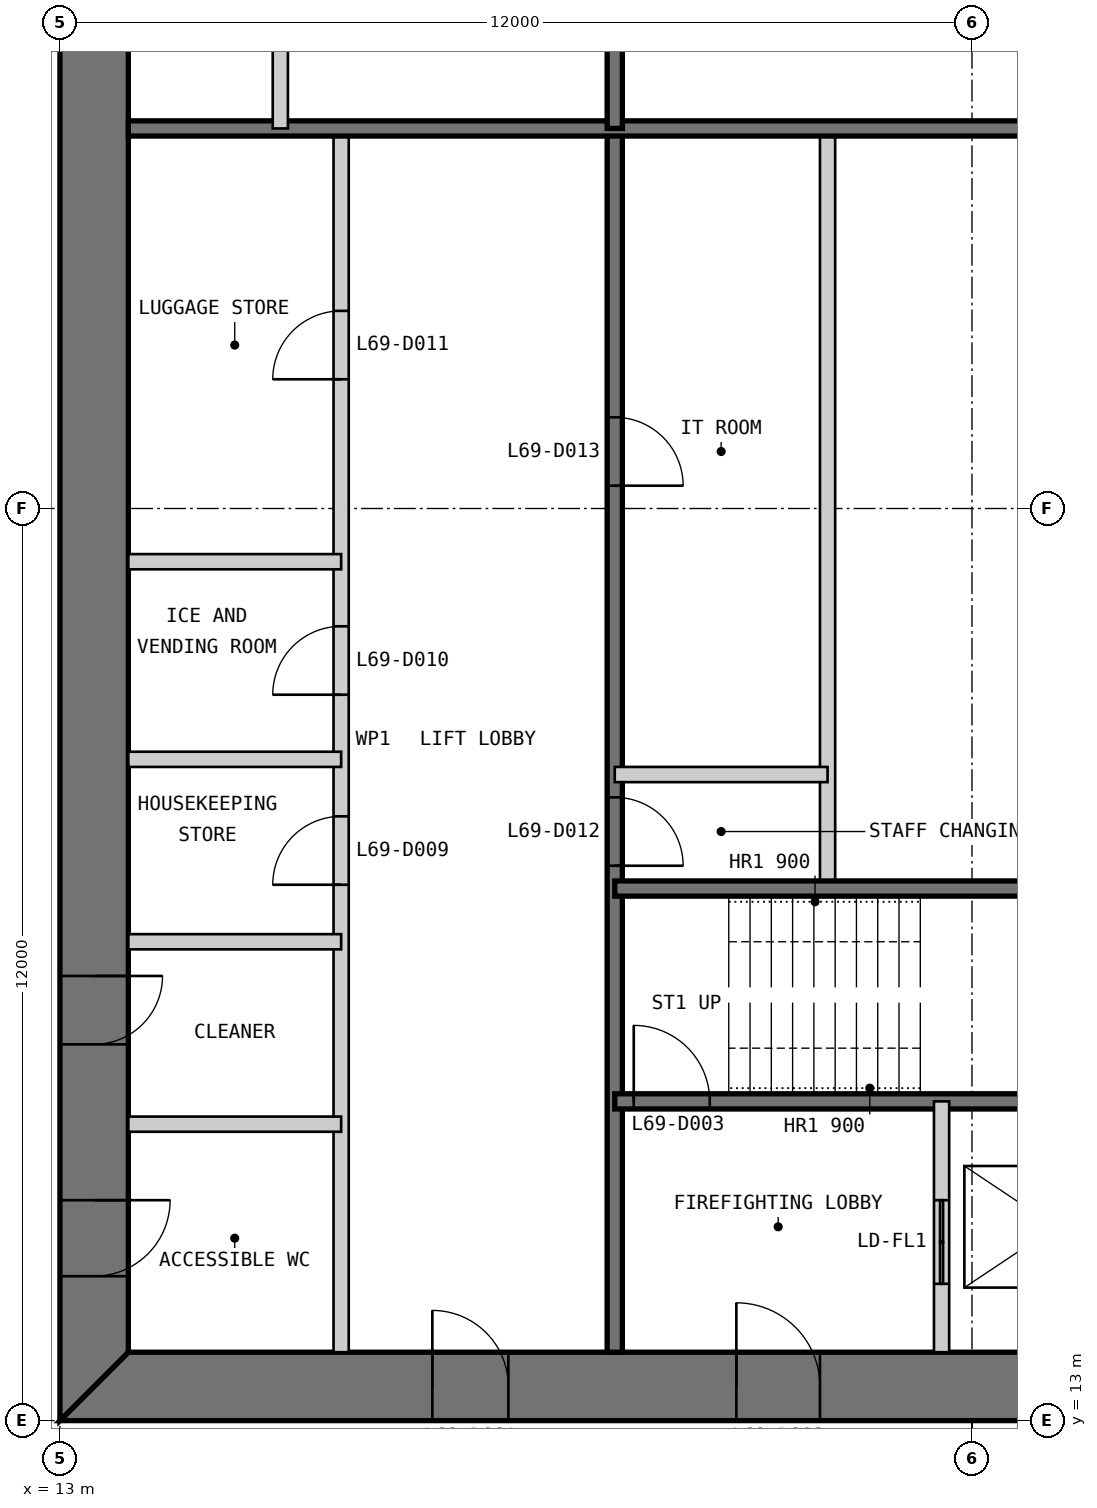
"""IFC4 building model, lengths in metres.
Left out: names, types, materials, properties, quantities, classifications, styles, units other than length and angle.
Written with IfcOpenShell. Run it as: python <this file> out.ifc"""

import sys

from ifc_helpers import new_model, si_unit, direction, frame, frame_2d, origin, place, context, subcontext, project, spatial, polyline, rectangle, outline, extrude, element, fill, save


model = new_model("IFC4")
c1 = context("Model", 3, precision=1e-05, world=origin(), true_north=direction((0.0, 1.0)))
c2 = subcontext(c1, "Body", "Model", "MODEL_VIEW")
j1 = project(units=[si_unit("LENGTHUNIT", "METRE"), si_unit("PLANEANGLEUNIT", "RADIAN")], contexts=[c1])
p1 = place(None, origin())
s1 = spatial("IfcSite", under=j1, at=p1, CompositionType="ELEMENT")
p2 = place(p1, origin())
s2 = spatial("IfcBuilding", under=s1, at=p2, CompositionType="ELEMENT")
p3 = place(p2, frame((0.0, 0.0, 286.6)))
s3 = spatial("IfcBuildingStorey", under=s2, at=p3, CompositionType="ELEMENT", Elevation=286.6)
p4 = place(p3, frame((13.0, 13.45, 0.0), z_axis=(0.0, 0.0, 1.0), x_axis=(1.0, 0.0, 0.0)))
e1 = element("IfcWall", 1, at=p4, inside=s3, PredefinedType="SHEAR", context=c2, shape_type="SweptSolid", body=[
    extrude(outline(polyline([(0.0, -0.45), (24.0, -0.45), (23.1, 0.45), (0.9, 0.45), (0.0, -0.45)])), origin(), (0.0, 0.0, 1.0), 3.4),
])
p5 = place(p4, frame((4.9, 0.0, 0.0)))
e2 = element("IfcOpeningElement", 2, at=p5, cuts=e1, PredefinedType="OPENING", context=c2, shape_type="SweptSolid", body=[
    extrude(rectangle(XDim=1.0, YDim=2.2, at=frame_2d((0.5, 1.1))), frame((0.0, 0.46, 0.0), z_axis=(0.0, -1.0, 0.0), x_axis=(1.0, 0.0, 0.0)), (0.0, 0.0, 1.0), 0.92),
])
p6 = place(p4, frame((8.9, 0.0, 0.0)))
e3 = element("IfcOpeningElement", 3, at=p6, cuts=e1, PredefinedType="OPENING", context=c2, shape_type="SweptSolid", body=[
    extrude(rectangle(XDim=1.1, YDim=2.2, at=frame_2d((0.55, 1.1))), frame((0.0, 0.46, 0.0), z_axis=(0.0, -1.0, 0.0), x_axis=(1.0, 0.0, 0.0)), (0.0, 0.0, 1.0), 0.92),
])
p7 = place(p4, frame((15.05, 0.0, 0.0)))
e4 = element("IfcOpeningElement", 4, at=p7, cuts=e1, PredefinedType="OPENING", context=c2, shape_type="SweptSolid", body=[
    extrude(rectangle(XDim=0.9, YDim=2.2, at=frame_2d((0.45, 1.1))), frame((0.0, 0.46, 0.0), z_axis=(0.0, -1.0, 0.0), x_axis=(1.0, 0.0, 0.0)), (0.0, 0.0, 1.0), 0.92),
])
p8 = place(p4, frame((17.9, 0.0, 0.0)))
e5 = element("IfcOpeningElement", 5, at=p8, cuts=e1, PredefinedType="OPENING", context=c2, shape_type="SweptSolid", body=[
    extrude(rectangle(XDim=1.0, YDim=2.2, at=frame_2d((0.5, 1.1))), frame((0.0, 0.46, 0.0), z_axis=(0.0, -1.0, 0.0), x_axis=(1.0, 0.0, 0.0)), (0.0, 0.0, 1.0), 0.92),
])
p9 = place(p4, frame((21.4, 0.0, 0.0)))
e6 = element("IfcOpeningElement", 6, at=p9, cuts=e1, PredefinedType="OPENING", context=c2, shape_type="SweptSolid", body=[
    extrude(rectangle(XDim=1.0, YDim=2.2, at=frame_2d((0.5, 1.1))), frame((0.0, 0.46, 0.0), z_axis=(0.0, -1.0, 0.0), x_axis=(1.0, 0.0, 0.0)), (0.0, 0.0, 1.0), 0.92),
])
p10 = place(p3, frame((13.45, 36.1, 0.0), z_axis=(0.0, 0.0, 1.0), x_axis=(0.0, -1.0, 0.0)))
e7 = element("IfcWall", 7, at=p10, inside=s3, PredefinedType="SHEAR", context=c2, shape_type="SweptSolid", body=[
    extrude(outline(polyline([(-0.9, -0.45), (23.1, -0.45), (22.2, 0.45), (0.0, 0.45), (-0.9, -0.45)])), origin(), (0.0, 0.0, 1.0), 3.4),
])
p11 = place(p10, frame((20.2, 0.0, 0.0)))
e8 = element("IfcOpeningElement", 8, at=p11, cuts=e7, PredefinedType="OPENING", context=c2, shape_type="SweptSolid", body=[
    extrude(rectangle(XDim=1.0, YDim=2.2, at=frame_2d((0.5, 1.1))), frame((0.0, 0.46, 0.0), z_axis=(0.0, -1.0, 0.0), x_axis=(1.0, 0.0, 0.0)), (0.0, 0.0, 1.0), 0.92),
])
p12 = place(p10, frame((17.25, 0.0, 0.0)))
e9 = element("IfcOpeningElement", 9, at=p12, cuts=e7, PredefinedType="OPENING", context=c2, shape_type="SweptSolid", body=[
    extrude(rectangle(XDim=0.9, YDim=2.2, at=frame_2d((0.45, 1.1))), frame((0.0, 0.46, 0.0), z_axis=(0.0, -1.0, 0.0), x_axis=(1.0, 0.0, 0.0)), (0.0, 0.0, 1.0), 0.92),
])
p13 = place(p3, frame((16.7, 13.9, 0.0), z_axis=(0.0, 0.0, 1.0), x_axis=(0.0, 1.0, 0.0)))
e10 = element("IfcWall", 10, at=p13, inside=s3, PredefinedType="PARTITIONING", context=c2, shape_type="SweptSolid", body=[
    extrude(rectangle(XDim=16.1, YDim=0.2, at=frame_2d((8.05, 0.0))), origin(), (0.0, 0.0, 1.0), 3.2),
])
p14 = place(p13, frame((6.15, 0.0, 0.0)))
e11 = element("IfcOpeningElement", 11, at=p14, cuts=e10, PredefinedType="OPENING", context=c2, shape_type="SweptSolid", body=[
    extrude(rectangle(XDim=0.9, YDim=2.2, at=frame_2d((0.45, 1.1))), frame((0.0, 0.11, 0.0), z_axis=(0.0, -1.0, 0.0), x_axis=(1.0, 0.0, 0.0)), (0.0, 0.0, 1.0), 0.22),
])
p15 = place(p13, frame((8.65, 0.0, 0.0)))
e12 = element("IfcOpeningElement", 12, at=p15, cuts=e10, PredefinedType="OPENING", context=c2, shape_type="SweptSolid", body=[
    extrude(rectangle(XDim=0.9, YDim=2.2, at=frame_2d((0.45, 1.1))), frame((0.0, 0.11, 0.0), z_axis=(0.0, -1.0, 0.0), x_axis=(1.0, 0.0, 0.0)), (0.0, 0.0, 1.0), 0.22),
])
p16 = place(p13, frame((12.8, 0.0, 0.0)))
e13 = element("IfcOpeningElement", 13, at=p16, cuts=e10, PredefinedType="OPENING", context=c2, shape_type="SweptSolid", body=[
    extrude(rectangle(XDim=0.9, YDim=2.2, at=frame_2d((0.45, 1.1))), frame((0.0, 0.11, 0.0), z_axis=(0.0, -1.0, 0.0), x_axis=(1.0, 0.0, 0.0)), (0.0, 0.0, 1.0), 0.22),
])
p17 = place(p3, frame((20.3, 13.9, 0.0), z_axis=(0.0, 0.0, 1.0), x_axis=(0.0, 1.0, 0.0)))
e14 = element("IfcWall", 14, at=p17, inside=s3, PredefinedType="SOLIDWALL", context=c2, shape_type="SweptSolid", body=[
    extrude(rectangle(XDim=16.1, YDim=0.2, at=frame_2d((8.05, 0.0))), origin(), (0.0, 0.0, 1.0), 3.2),
])
p18 = place(p17, frame((6.4, 0.0, 0.0)))
e15 = element("IfcOpeningElement", 15, at=p18, cuts=e14, PredefinedType="OPENING", context=c2, shape_type="SweptSolid", body=[
    extrude(rectangle(XDim=0.9, YDim=2.2, at=frame_2d((0.45, 1.1))), frame((0.0, 0.11, 0.0), z_axis=(0.0, -1.0, 0.0), x_axis=(1.0, 0.0, 0.0)), (0.0, 0.0, 1.0), 0.22),
])
p19 = place(p17, frame((11.4, 0.0, 0.0)))
e16 = element("IfcOpeningElement", 16, at=p19, cuts=e14, PredefinedType="OPENING", context=c2, shape_type="SweptSolid", body=[
    extrude(rectangle(XDim=0.9, YDim=2.2, at=frame_2d((0.45, 1.1))), frame((0.0, 0.11, 0.0), z_axis=(0.0, -1.0, 0.0), x_axis=(1.0, 0.0, 0.0)), (0.0, 0.0, 1.0), 0.22),
])
p20 = place(p3, frame((23.1, 20.0, 0.0), z_axis=(0.0, 0.0, 1.0), x_axis=(0.0, 1.0, 0.0)))
e17 = element("IfcWall", 17, at=p20, inside=s3, PredefinedType="PARTITIONING", context=c2, shape_type="SweptSolid", body=[
    extrude(rectangle(XDim=10.0, YDim=0.2, at=frame_2d((5.0, 0.0))), origin(), (0.0, 0.0, 1.0), 3.2),
])
p21 = place(p3, frame((20.3, 17.2, 0.0), z_axis=(0.0, 0.0, 1.0), x_axis=(1.0, 0.0, 0.0)))
e18 = element("IfcWall", 18, at=p21, inside=s3, PredefinedType="SOLIDWALL", context=c2, shape_type="SweptSolid", body=[
    extrude(rectangle(XDim=9.4, YDim=0.2, at=frame_2d((4.7, 0.0))), origin(), (0.0, 0.0, 1.0), 3.2),
])
p22 = place(p21, frame((0.25, 0.0, 0.0)))
e19 = element("IfcOpeningElement", 19, at=p22, cuts=e18, PredefinedType="OPENING", context=c2, shape_type="SweptSolid", body=[
    extrude(rectangle(XDim=1.0, YDim=2.2, at=frame_2d((0.5, 1.1))), frame((0.0, 0.11, 0.0), z_axis=(0.0, -1.0, 0.0), x_axis=(1.0, 0.0, 0.0)), (0.0, 0.0, 1.0), 0.22),
])
p23 = place(p3, frame((20.3, 20.0, 0.0), z_axis=(0.0, 0.0, 1.0), x_axis=(1.0, 0.0, 0.0)))
e20 = element("IfcWall", 20, at=p23, inside=s3, PredefinedType="SOLIDWALL", context=c2, shape_type="SweptSolid", body=[
    extrude(rectangle(XDim=15.8, YDim=0.2, at=frame_2d((7.9, 0.0))), origin(), (0.0, 0.0, 1.0), 3.2),
])
p24 = place(p3, frame((24.6, 13.9, 0.0), z_axis=(0.0, 0.0, 1.0), x_axis=(0.0, 1.0, 0.0)))
e21 = element("IfcWall", 21, at=p24, inside=s3, PredefinedType="PARTITIONING", context=c2, shape_type="SweptSolid", body=[
    extrude(rectangle(XDim=3.3, YDim=0.2, at=frame_2d((1.65, 0.0))), origin(), (0.0, 0.0, 1.0), 3.2),
])
p25 = place(p24, frame((0.9, 0.0, 0.0)))
e22 = element("IfcOpeningElement", 22, at=p25, cuts=e21, PredefinedType="OPENING", context=c2, shape_type="SweptSolid", body=[
    extrude(rectangle(XDim=1.1, YDim=2.2, at=frame_2d((0.55, 1.1))), frame((0.0, 0.11, 0.0), z_axis=(0.0, -1.0, 0.0), x_axis=(1.0, 0.0, 0.0)), (0.0, 0.0, 1.0), 0.22),
])
for number, where, z_axis, x_axis in (
    (23, (13.9, 16.9, 0.0), (0.0, 0.0, 1.0), (1.0, 0.0, 0.0)),
    (24, (13.9, 19.3, 0.0), (0.0, 0.0, 1.0), (1.0, 0.0, 0.0)),
    (25, (13.9, 21.7, 0.0), (0.0, 0.0, 1.0), (1.0, 0.0, 0.0)),
    (26, (13.9, 24.3, 0.0), (0.0, 0.0, 1.0), (1.0, 0.0, 0.0)),
    (27, (20.3, 21.5, 0.0), (0.0, 0.0, 1.0), (1.0, 0.0, 0.0)),
):
    element("IfcWall", number, at=place(p3, frame(where, z_axis=z_axis, x_axis=x_axis)), inside=s3, PredefinedType="PARTITIONING", context=c2, shape_type="SweptSolid", body=[
        extrude(rectangle(XDim=2.8, YDim=0.2, at=frame_2d((1.4, 0.0))), origin(), (0.0, 0.0, 1.0), 3.2),
    ])
p26 = place(p3, frame((29.7, 30.0, 0.0), z_axis=(0.0, 0.0, 1.0), x_axis=(-1.0, 0.0, 0.0)))
e28 = element("IfcWall", 28, at=p26, inside=s3, PredefinedType="SOLIDWALL", context=c2, shape_type="SweptSolid", body=[
    extrude(rectangle(XDim=15.8, YDim=0.2, at=frame_2d((7.9, 0.0))), origin(), (0.0, 0.0, 1.0), 3.2),
])
p27 = place(p3, frame((20.3, 36.1, 0.0), z_axis=(0.0, 0.0, 1.0), x_axis=(0.0, -1.0, 0.0)))
e29 = element("IfcWall", 29, at=p27, inside=s3, PredefinedType="SOLIDWALL", context=c2, shape_type="SweptSolid", body=[
    extrude(rectangle(XDim=6.1, YDim=0.2, at=frame_2d((3.05, 0.0))), origin(), (0.0, 0.0, 1.0), 3.2),
])
p28 = place(p3, frame((15.9, 36.1, 0.0), z_axis=(0.0, 0.0, 1.0), x_axis=(0.0, -1.0, 0.0)))
e30 = element("IfcWall", 30, at=p28, inside=s3, PredefinedType="PARTITIONING", context=c2, shape_type="SweptSolid", body=[
    extrude(rectangle(XDim=6.1, YDim=0.2, at=frame_2d((3.05, 0.0))), origin(), (0.0, 0.0, 1.0), 3.2),
])
p29 = place(p5, origin())
e31 = element("IfcDoor", 31, at=p29, inside=s3, OperationType="SINGLE_SWING_LEFT", PredefinedType="DOOR", context=c2, shape_type="SweptSolid", body=[
    extrude(rectangle(XDim=1.0, YDim=2.2, at=frame_2d((0.5, 1.1))), frame((0.0, 0.025, 0.0), z_axis=(0.0, -1.0, 0.0), x_axis=(1.0, 0.0, 0.0)), (0.0, 0.0, 1.0), 0.05),
    extrude(outline(polyline([(0.0, 0.0), (0.04, 0.0), (0.04, 2.16), (0.96, 2.16), (0.96, 0.0), (1.0, 0.0), (1.0, 2.2), (0.0, 2.2), (0.0, 0.0)])), frame((0.0, 0.3, 0.0), z_axis=(0.0, -1.0, 0.0), x_axis=(1.0, 0.0, 0.0)), (0.0, 0.0, 1.0), 0.6),
])
fill(e2, e31)
p30 = place(p6, origin())
e32 = element("IfcDoor", 32, at=p30, inside=s3, OperationType="SINGLE_SWING_LEFT", PredefinedType="DOOR", context=c2, shape_type="SweptSolid", body=[
    extrude(rectangle(XDim=1.1, YDim=2.2, at=frame_2d((0.55, 1.1))), frame((0.0, 0.025, 0.0), z_axis=(0.0, -1.0, 0.0), x_axis=(1.0, 0.0, 0.0)), (0.0, 0.0, 1.0), 0.05),
    extrude(outline(polyline([(0.0, 0.0), (0.04, 0.0), (0.04, 2.16), (1.06, 2.16), (1.06, 0.0), (1.1, 0.0), (1.1, 2.2), (0.0, 2.2), (0.0, 0.0)])), frame((0.0, 0.3, 0.0), z_axis=(0.0, -1.0, 0.0), x_axis=(1.0, 0.0, 0.0)), (0.0, 0.0, 1.0), 0.6),
])
fill(e3, e32)
p31 = place(p22, origin())
e33 = element("IfcDoor", 33, at=p31, inside=s3, OperationType="SINGLE_SWING_LEFT", PredefinedType="DOOR", context=c2, shape_type="SweptSolid", body=[
    extrude(rectangle(XDim=1.0, YDim=2.2, at=frame_2d((0.5, 1.1))), frame((0.0, 0.025, 0.0), z_axis=(0.0, -1.0, 0.0), x_axis=(1.0, 0.0, 0.0)), (0.0, 0.0, 1.0), 0.05),
])
fill(e19, e33)
p32 = place(p11, origin())
e34 = element("IfcDoor", 34, at=p32, inside=s3, OperationType="SINGLE_SWING_LEFT", PredefinedType="DOOR", context=c2, shape_type="SweptSolid", body=[
    extrude(rectangle(XDim=1.0, YDim=2.2, at=frame_2d((0.5, 1.1))), frame((0.0, 0.025, 0.0), z_axis=(0.0, -1.0, 0.0), x_axis=(1.0, 0.0, 0.0)), (0.0, 0.0, 1.0), 0.05),
    extrude(outline(polyline([(0.0, 0.0), (0.04, 0.0), (0.04, 2.16), (0.96, 2.16), (0.96, 0.0), (1.0, 0.0), (1.0, 2.2), (0.0, 2.2), (0.0, 0.0)])), frame((0.0, 0.3, 0.0), z_axis=(0.0, -1.0, 0.0), x_axis=(1.0, 0.0, 0.0)), (0.0, 0.0, 1.0), 0.6),
])
fill(e8, e34)
p33 = place(p12, origin())
e35 = element("IfcDoor", 35, at=p33, inside=s3, OperationType="SINGLE_SWING_LEFT", PredefinedType="DOOR", context=c2, shape_type="SweptSolid", body=[
    extrude(rectangle(XDim=0.9, YDim=2.2, at=frame_2d((0.45, 1.1))), frame((0.0, 0.025, 0.0), z_axis=(0.0, -1.0, 0.0), x_axis=(1.0, 0.0, 0.0)), (0.0, 0.0, 1.0), 0.05),
    extrude(outline(polyline([(0.0, 0.0), (0.04, 0.0), (0.04, 2.16), (0.86, 2.16), (0.86, 0.0), (0.9, 0.0), (0.9, 2.2), (0.0, 2.2), (0.0, 0.0)])), frame((0.0, 0.3, 0.0), z_axis=(0.0, -1.0, 0.0), x_axis=(1.0, 0.0, 0.0)), (0.0, 0.0, 1.0), 0.6),
])
fill(e9, e35)
p34 = place(p14, origin())
e36 = element("IfcDoor", 36, at=p34, inside=s3, OperationType="SINGLE_SWING_LEFT", PredefinedType="DOOR", context=c2, shape_type="SweptSolid", body=[
    extrude(rectangle(XDim=0.9, YDim=2.2, at=frame_2d((0.45, 1.1))), frame((0.0, 0.025, 0.0), z_axis=(0.0, -1.0, 0.0), x_axis=(1.0, 0.0, 0.0)), (0.0, 0.0, 1.0), 0.05),
])
fill(e11, e36)
p35 = place(p15, origin())
e37 = element("IfcDoor", 37, at=p35, inside=s3, OperationType="SINGLE_SWING_LEFT", PredefinedType="DOOR", context=c2, shape_type="SweptSolid", body=[
    extrude(rectangle(XDim=0.9, YDim=2.2, at=frame_2d((0.45, 1.1))), frame((0.0, 0.025, 0.0), z_axis=(0.0, -1.0, 0.0), x_axis=(1.0, 0.0, 0.0)), (0.0, 0.0, 1.0), 0.05),
])
fill(e12, e37)
p36 = place(p16, origin())
e38 = element("IfcDoor", 38, at=p36, inside=s3, OperationType="SINGLE_SWING_LEFT", PredefinedType="DOOR", context=c2, shape_type="SweptSolid", body=[
    extrude(rectangle(XDim=0.9, YDim=2.2, at=frame_2d((0.45, 1.1))), frame((0.0, 0.025, 0.0), z_axis=(0.0, -1.0, 0.0), x_axis=(1.0, 0.0, 0.0)), (0.0, 0.0, 1.0), 0.05),
])
fill(e13, e38)
p37 = place(p18, frame((0.9, 0.0, 0.0), z_axis=(0.0, 0.0, 1.0), x_axis=(-1.0, 0.0, 0.0)))
e39 = element("IfcDoor", 39, at=p37, inside=s3, OperationType="SINGLE_SWING_RIGHT", PredefinedType="DOOR", context=c2, shape_type="SweptSolid", body=[
    extrude(rectangle(XDim=0.9, YDim=2.2, at=frame_2d((0.45, 1.1))), frame((0.0, 0.025, 0.0), z_axis=(0.0, -1.0, 0.0), x_axis=(1.0, 0.0, 0.0)), (0.0, 0.0, 1.0), 0.05),
])
fill(e15, e39)
p38 = place(p19, frame((0.9, 0.0, 0.0), z_axis=(0.0, 0.0, 1.0), x_axis=(-1.0, 0.0, 0.0)))
e40 = element("IfcDoor", 40, at=p38, inside=s3, OperationType="SINGLE_SWING_RIGHT", PredefinedType="DOOR", context=c2, shape_type="SweptSolid", body=[
    extrude(rectangle(XDim=0.9, YDim=2.2, at=frame_2d((0.45, 1.1))), frame((0.0, 0.025, 0.0), z_axis=(0.0, -1.0, 0.0), x_axis=(1.0, 0.0, 0.0)), (0.0, 0.0, 1.0), 0.05),
])
fill(e16, e40)
p39 = place(p25, origin())
e41 = element("IfcDoor", 41, at=p39, inside=s3, OperationType="DOUBLE_DOOR_SLIDING", PredefinedType="DOOR", context=c2, shape_type="SweptSolid", body=[
    extrude(rectangle(XDim=1.1, YDim=2.2, at=frame_2d((0.55, 1.1))), frame((0.0, 0.025, 0.0), z_axis=(0.0, -1.0, 0.0), x_axis=(1.0, 0.0, 0.0)), (0.0, 0.0, 1.0), 0.05),
])
fill(e22, e41)
save(model, sys.argv[1])
